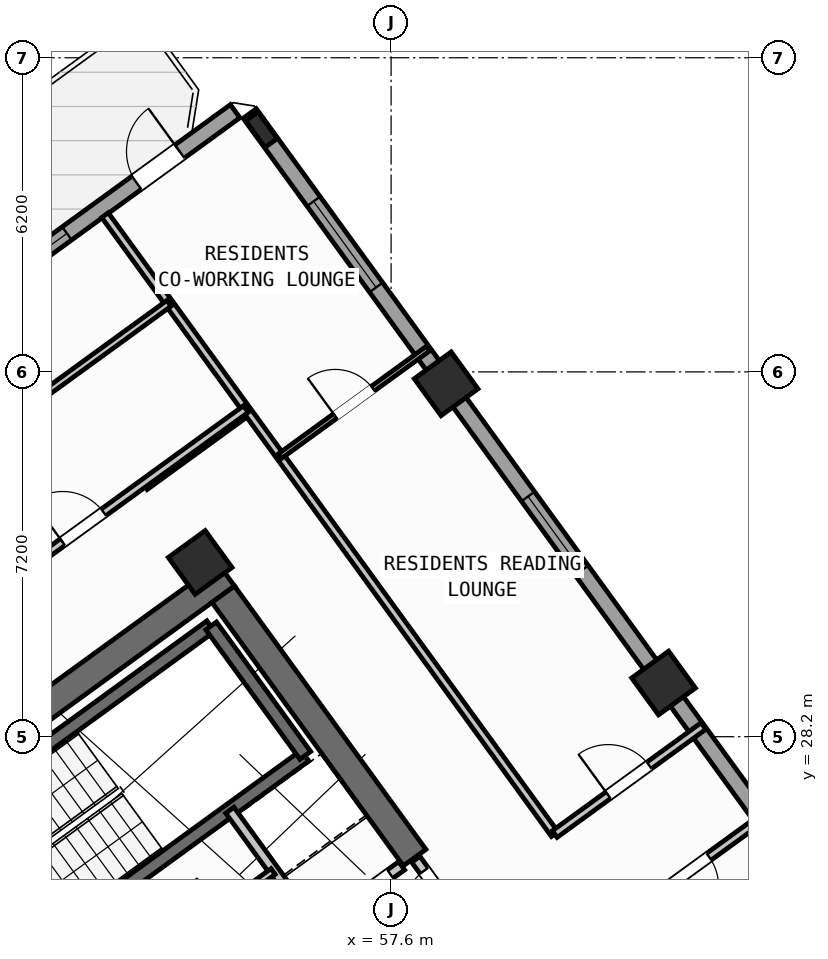
"""IFC4 building model, lengths in metres.
Left out: names, types, materials, properties, quantities, classifications, styles, units other than length and angle.
Written with IfcOpenShell. Run it as: python <this file> out.ifc"""

import sys

from ifc_helpers import new_model, si_unit, direction, frame, frame_2d, origin, origin_2d, place, context, subcontext, project, spatial, rectangle, hollow_rectangle, i_section, extrude, source, transform, mapped, element, fill, save


model = new_model("IFC4")
c1 = context("Model", 3, precision=1e-05, world=origin(), true_north=direction((0.0, 1.0)))
c2 = subcontext(c1, "Body", "Model", "MODEL_VIEW")
j1 = project(units=[si_unit("LENGTHUNIT", "METRE"), si_unit("PLANEANGLEUNIT", "RADIAN")], contexts=[c1])
p1 = place(None, origin())
s1 = spatial("IfcSite", under=j1, at=p1, CompositionType="ELEMENT")
p2 = place(p1, origin())
s2 = spatial("IfcBuilding", under=s1, at=p2, CompositionType="ELEMENT")
p3 = place(p2, frame((0.0, 0.0, 116.1)))
s3 = spatial("IfcBuildingStorey", under=s2, at=p3, CompositionType="ELEMENT", Elevation=116.1)
p4 = place(p3, frame((44.365, 24.142, 0.0), z_axis=(0.0, 0.0, 1.0), x_axis=(0.809024304885, 0.587775190107, 0.0)))
e1 = element("IfcWall", 1, at=p4, inside=s3, PredefinedType="SHEAR", context=c2, shape_type="SweptSolid", body=[
    extrude(rectangle(XDim=12.34, YDim=0.55, at=frame_2d((6.17, 0.0))), origin(), (0.0, 0.0, 1.0), 3.35),
])
p5 = place(p3, frame((58.064, 25.813, 0.0), z_axis=(0.0, 0.0, 1.0), x_axis=(-0.587764933797, 0.809031756236, 0.0)))
e2 = element("IfcWall", 2, at=p5, inside=s3, PredefinedType="SHEAR", context=c2, shape_type="SweptSolid", body=[
    extrude(rectangle(XDim=6.425, YDim=0.55, at=frame_2d((3.212, 0.0))), origin(), (0.0, 0.0, 1.0), 3.35),
])
m1 = source(origin(), c2, "Body", "SweptSolid", [
    extrude(hollow_rectangle(XDim=0.9, YDim=0.9, WallThickness=0.036, at=origin_2d()), origin(), (0.0, 0.0, 1.0), 3.6),
])
for number, where, z_axis, x_axis in (
    (3, (53.832, 31.638, 0.0), (0.0, 0.0, 1.0), (0.809, 0.588, 0.0)),
    (4, (62.977, 29.259, 0.0), (0.0, 0.0, 1.0), (0.809, 0.588, 0.0)),
    (5, (58.686, 35.165, 0.0), (0.0, 0.0, 1.0), (0.809, 0.588, 0.0)),
):
    element("IfcColumn", number, at=place(p3, frame(where, z_axis=z_axis, x_axis=x_axis)), inside=s3, PredefinedType="COLUMN", context=c2, shape_type="MappedRepresentation", body=[
        mapped(m1, transform((0.0, 0.0, 0.0), scale=1.0)),
    ])
m2 = source(origin(), c2, "Body", "SweptSolid", [
    extrude(i_section(OverallWidth=0.3, OverallDepth=0.65, WebThickness=0.016, FlangeThickness=0.031, at=origin_2d()), origin(), (0.0, 0.0, 1.0), 3.6),
])
p6 = place(p3, frame((55.042, 40.181, 0.0), z_axis=(0.0, 0.0, 1.0), x_axis=(0.809016994375, 0.587785252292, 0.0)))
e6 = element("IfcColumn", 6, at=p6, inside=s3, PredefinedType="COLUMN", context=c2, shape_type="MappedRepresentation", body=[
    mapped(m2, transform((0.0, 0.0, 0.0), scale=1.0)),
])
p7 = place(p3, frame((42.207, 31.597, 0.0), z_axis=(0.0, 0.0, 1.0), x_axis=(0.809020333377, 0.587780656523, 0.0)))
e7 = element("IfcWall", 7, at=p7, inside=s3, PredefinedType="STANDARD", context=c2, shape_type="SweptSolid", body=[
    extrude(rectangle(XDim=15.223, YDim=0.32, at=frame_2d((7.611, 0.0))), origin(), (0.0, 0.0, 1.0), 3.35),
])
p8 = place(p7, frame((12.82, 0.0, 0.0)))
e8 = element("IfcOpeningElement", 8, at=p8, cuts=e7, PredefinedType="OPENING", context=c2, shape_type="SweptSolid", body=[
    extrude(rectangle(XDim=1.05, YDim=2.15, at=frame_2d((0.525, 1.075))), frame((0.0, 0.17, 0.0), z_axis=(0.0, -1.0, 0.0), x_axis=(1.0, 0.0, 0.0)), (0.0, 0.0, 1.0), 0.34),
])
p9 = place(p7, frame((1.52, 0.0, 0.8)))
e9 = element("IfcOpeningElement", 9, at=p9, cuts=e7, PredefinedType="OPENING", context=c2, shape_type="SweptSolid", body=[
    extrude(rectangle(XDim=2.1, YDim=1.55, at=frame_2d((1.05, 0.775))), frame((0.0, 0.17, 0.0), z_axis=(0.0, -1.0, 0.0), x_axis=(1.0, 0.0, 0.0)), (0.0, 0.0, 1.0), 0.34),
])
p10 = place(p7, frame((5.76, 0.0, 0.8)))
e10 = element("IfcOpeningElement", 10, at=p10, cuts=e7, PredefinedType="OPENING", context=c2, shape_type="SweptSolid", body=[
    extrude(rectangle(XDim=2.1, YDim=1.55, at=frame_2d((1.05, 0.775))), frame((0.0, 0.17, 0.0), z_axis=(0.0, -1.0, 0.0), x_axis=(1.0, 0.0, 0.0)), (0.0, 0.0, 1.0), 0.34),
])
p11 = place(p7, frame((10.219, 0.0, 1.0)))
e11 = element("IfcOpeningElement", 11, at=p11, cuts=e7, PredefinedType="OPENING", context=c2, shape_type="SweptSolid", body=[
    extrude(rectangle(XDim=0.9, YDim=1.25, at=frame_2d((0.45, 0.625))), frame((0.0, 0.17, 0.0), z_axis=(0.0, -1.0, 0.0), x_axis=(1.0, 0.0, 0.0)), (0.0, 0.0, 1.0), 0.34),
])
p12 = place(p3, frame((54.81, 40.5, 0.0), z_axis=(0.0, 0.0, 1.0), x_axis=(0.587783625747, -0.809018176127, 0.0)))
e12 = element("IfcWall", 12, at=p12, inside=s3, PredefinedType="STANDARD", context=c2, shape_type="SweptSolid", body=[
    extrude(rectangle(XDim=21.587, YDim=0.32, at=frame_2d((10.794, 0.0))), origin(), (0.0, 0.0, 1.0), 2.775),
])
p13 = place(p12, frame((2.143, 0.0, 0.8)))
e13 = element("IfcOpeningElement", 13, at=p13, cuts=e12, PredefinedType="OPENING", context=c2, shape_type="SweptSolid", body=[
    extrude(rectangle(XDim=2.1, YDim=1.55, at=frame_2d((1.05, 0.775))), frame((0.0, 0.17, 0.0), z_axis=(0.0, -1.0, 0.0), x_axis=(1.0, 0.0, 0.0)), (0.0, 0.0, 1.0), 0.34),
])
p14 = place(p12, frame((9.344, 0.0, 0.85)))
e14 = element("IfcOpeningElement", 14, at=p14, cuts=e12, PredefinedType="OPENING", context=c2, shape_type="SweptSolid", body=[
    extrude(rectangle(XDim=1.8, YDim=1.5, at=frame_2d((0.9, 0.75))), frame((0.0, 0.17, 0.0), z_axis=(0.0, -1.0, 0.0), x_axis=(1.0, 0.0, 0.0)), (0.0, 0.0, 1.0), 0.34),
])
p15 = place(p12, frame((18.309, 0.0, 0.85)))
e15 = element("IfcOpeningElement", 15, at=p15, cuts=e12, PredefinedType="OPENING", context=c2, shape_type="SweptSolid", body=[
    extrude(rectangle(XDim=1.5, YDim=1.5, at=frame_2d((0.75, 0.75))), frame((0.0, 0.17, 0.0), z_axis=(0.0, -1.0, 0.0), x_axis=(1.0, 0.0, 0.0)), (0.0, 0.0, 1.0), 0.34),
])
p16 = place(p3, frame((48.006, 25.996, 0.0), z_axis=(0.0, 0.0, 1.0), x_axis=(0.80901903764, 0.587782439969, 0.0)))
e16 = element("IfcWall", 16, at=p16, inside=s3, PredefinedType="SHEAR", context=c2, shape_type="SweptSolid", body=[
    extrude(rectangle(XDim=7.46, YDim=0.26, at=frame_2d((3.73, 0.0))), origin(), (0.0, 0.0, 1.0), 3.35),
])
p17 = place(p3, frame((49.863, 23.44, 0.0), z_axis=(0.0, 0.0, 1.0), x_axis=(0.809003474932, 0.587803859759, 0.0)))
e17 = element("IfcWall", 17, at=p17, inside=s3, PredefinedType="SHEAR", context=c2, shape_type="SweptSolid", body=[
    extrude(rectangle(XDim=7.46, YDim=0.26, at=frame_2d((3.73, 0.0))), origin(), (0.0, 0.0, 1.0), 3.35),
])
p18 = place(p17, frame((0.36, 0.0, 0.0)))
e18 = element("IfcOpeningElement", 18, at=p18, cuts=e17, PredefinedType="OPENING", context=c2, shape_type="SweptSolid", body=[
    extrude(rectangle(XDim=0.86, YDim=2.05, at=frame_2d((0.43, 1.025))), frame((0.0, 0.14, 0.0), z_axis=(0.0, -1.0, 0.0), x_axis=(1.0, 0.0, 0.0)), (0.0, 0.0, 1.0), 0.28),
])
p19 = place(p3, frame((55.906, 27.831, 0.0), z_axis=(0.0, 0.0, 1.0), x_axis=(-0.587804123638, 0.809003283204, 0.0)))
e19 = element("IfcWall", 19, at=p19, inside=s3, PredefinedType="SHEAR", context=c2, shape_type="SweptSolid", body=[
    extrude(rectangle(XDim=3.16, YDim=0.26, at=frame_2d((1.58, 0.0))), origin(), (0.0, 0.0, 1.0), 3.35),
])
p20 = place(p3, frame((56.111, 24.419, 0.0), z_axis=(0.0, 0.0, 1.0), x_axis=(-0.58777848983, 0.809021907548, 0.0)))
e20 = element("IfcWall", 20, at=p20, inside=s3, PredefinedType="STANDARD", context=c2, shape_type="SweptSolid", body=[
    extrude(rectangle(XDim=2.88, YDim=0.2, at=frame_2d((1.44, 0.0))), origin(), (0.0, 0.0, 1.0), 3.34),
])
p21 = place(p3, frame((53.425, 22.468, 0.0), z_axis=(0.0, 0.0, 1.0), x_axis=(0.809024377198, 0.587775090574, 0.0)))
e21 = element("IfcWall", 21, at=p21, inside=s3, PredefinedType="STANDARD", context=c2, shape_type="SweptSolid", body=[
    extrude(rectangle(XDim=5.418, YDim=0.2, at=frame_2d((2.709, 0.0))), origin(), (0.0, 0.0, 1.0), 3.34),
])
p22 = place(p21, frame((4.28, 0.0, 0.0)))
e22 = element("IfcOpeningElement", 22, at=p22, cuts=e21, PredefinedType="OPENING", context=c2, shape_type="SweptSolid", body=[
    extrude(rectangle(XDim=0.86, YDim=2.05, at=frame_2d((0.43, 1.025))), frame((0.0, 0.11, 0.0), z_axis=(0.0, -1.0, 0.0), x_axis=(1.0, 0.0, 0.0)), (0.0, 0.0, 1.0), 0.22),
])
p23 = place(p21, frame((1.45, 0.0, 0.0)))
e23 = element("IfcOpeningElement", 23, at=p23, cuts=e21, PredefinedType="OPENING", context=c2, shape_type="SweptSolid", body=[
    extrude(rectangle(XDim=0.86, YDim=2.05, at=frame_2d((0.43, 1.025))), frame((0.0, 0.11, 0.0), z_axis=(0.0, -1.0, 0.0), x_axis=(1.0, 0.0, 0.0)), (0.0, 0.0, 1.0), 0.22),
])
p24 = place(p3, frame((52.618, 23.612, 0.0), z_axis=(0.0, 0.0, 1.0), x_axis=(0.809009587469, 0.587795446889, 0.0)))
e24 = element("IfcWall", 24, at=p24, inside=s3, PredefinedType="PLUMBINGWALL", context=c2, shape_type="SweptSolid", body=[
    extrude(rectangle(XDim=3.28, YDim=0.14, at=frame_2d((1.64, 0.0))), origin(), (0.0, 0.0, 1.0), 3.34),
])
p25 = place(p24, frame((1.2, 0.0, 0.0)))
e25 = element("IfcOpeningElement", 25, at=p25, cuts=e24, PredefinedType="OPENING", context=c2, shape_type="SweptSolid", body=[
    extrude(rectangle(XDim=0.78, YDim=2.05, at=frame_2d((0.39, 1.025))), frame((0.0, 0.08, 0.0), z_axis=(0.0, -1.0, 0.0), x_axis=(1.0, 0.0, 0.0)), (0.0, 0.0, 1.0), 0.16),
])
p26 = place(p3, frame((59.827, 23.386, 0.0), z_axis=(0.0, 0.0, 1.0), x_axis=(-0.587803840107, 0.809003489211, 0.0)))
e26 = element("IfcWall", 26, at=p26, inside=s3, PredefinedType="STANDARD", context=c2, shape_type="SweptSolid", body=[
    extrude(rectangle(XDim=2.96, YDim=0.2, at=frame_2d((1.48, 0.0))), origin(), (0.0, 0.0, 1.0), 3.34),
])
p27 = place(p26, frame((1.68, 0.0, 0.0)))
e27 = element("IfcOpeningElement", 27, at=p27, cuts=e26, PredefinedType="OPENING", context=c2, shape_type="SweptSolid", body=[
    extrude(rectangle(XDim=1.0, YDim=2.1, at=frame_2d((0.5, 1.05))), frame((0.0, 0.11, 0.0), z_axis=(0.0, -1.0, 0.0), x_axis=(1.0, 0.0, 0.0)), (0.0, 0.0, 1.0), 0.22),
])
p28 = place(p3, frame((52.739, 33.143, 0.0), z_axis=(0.0, 0.0, 1.0), x_axis=(0.809000999347, 0.58780726693, 0.0)))
e28 = element("IfcWall", 28, at=p28, inside=s3, PredefinedType="PARTITIONING", context=c2, shape_type="SweptSolid", body=[
    extrude(rectangle(XDim=2.51, YDim=0.16, at=frame_2d((1.255, 0.0))), origin(), (0.0, 0.0, 1.0), 3.34),
])
p29 = place(p3, frame((60.829, 26.278, 0.0), z_axis=(0.0, 0.0, 1.0), x_axis=(-0.587777474174, 0.809022645451, 0.0)))
e29 = element("IfcWall", 29, at=p29, inside=s3, PredefinedType="PARTITIONING", context=c2, shape_type="SweptSolid", body=[
    extrude(rectangle(XDim=15.1, YDim=0.16, at=frame_2d((7.55, 0.0))), origin(), (0.0, 0.0, 1.0), 3.34),
])
p30 = place(p3, frame((62.093, 24.538, 0.0), z_axis=(0.0, 0.0, 1.0), x_axis=(0.809035546126, 0.58775971715, 0.0)))
e30 = element("IfcWall", 30, at=p30, inside=s3, PredefinedType="PARTITIONING", context=c2, shape_type="SweptSolid", body=[
    extrude(rectangle(XDim=3.63, YDim=0.16, at=frame_2d((1.815, 0.0))), origin(), (0.0, 0.0, 1.0), 3.34),
])
p31 = place(p30, frame((1.2, 0.0, 0.0)))
e31 = element("IfcOpeningElement", 31, at=p31, cuts=e30, PredefinedType="OPENING", context=c2, shape_type="SweptSolid", body=[
    extrude(rectangle(XDim=1.0, YDim=2.1, at=frame_2d((0.5, 1.05))), frame((0.0, 0.09, 0.0), z_axis=(0.0, -1.0, 0.0), x_axis=(1.0, 0.0, 0.0)), (0.0, 0.0, 1.0), 0.18),
])
p32 = place(p3, frame((60.829, 26.278, 0.0), z_axis=(0.0, 0.0, 1.0), x_axis=(0.809003564202, 0.587803736896, 0.0)))
e32 = element("IfcWall", 32, at=p32, inside=s3, PredefinedType="PARTITIONING", context=c2, shape_type="SweptSolid", body=[
    extrude(rectangle(XDim=3.63, YDim=0.16, at=frame_2d((1.815, 0.0))), origin(), (0.0, 0.0, 1.0), 3.34),
])
p33 = place(p32, frame((1.305, 0.0, 0.0)))
e33 = element("IfcOpeningElement", 33, at=p33, cuts=e32, PredefinedType="OPENING", context=c2, shape_type="SweptSolid", body=[
    extrude(rectangle(XDim=1.0, YDim=2.1, at=frame_2d((0.5, 1.05))), frame((0.0, 0.09, 0.0), z_axis=(0.0, -1.0, 0.0), x_axis=(1.0, 0.0, 0.0)), (0.0, 0.0, 1.0), 0.18),
])
p34 = place(p3, frame((55.409, 33.738, 0.0), z_axis=(0.0, 0.0, 1.0), x_axis=(0.809005039917, 0.58780170584, 0.0)))
e34 = element("IfcWall", 34, at=p34, inside=s3, PredefinedType="PARTITIONING", context=c2, shape_type="SweptSolid", body=[
    extrude(rectangle(XDim=3.61, YDim=0.11, at=frame_2d((1.805, 0.0))), origin(), (0.0, 0.0, 1.0), 3.34),
])
p35 = place(p34, frame((1.345, 0.0, 0.0)))
e35 = element("IfcOpeningElement", 35, at=p35, cuts=e34, PredefinedType="OPENING", context=c2, shape_type="SweptSolid", body=[
    extrude(rectangle(XDim=0.92, YDim=2.08, at=frame_2d((0.46, 1.04))), frame((0.0, 0.065, 0.0), z_axis=(0.0, -1.0, 0.0), x_axis=(1.0, 0.0, 0.0)), (0.0, 0.0, 1.0), 0.13),
])
p36 = place(p3, frame((42.866, 26.044, 0.0), z_axis=(0.0, 0.0, 1.0), x_axis=(0.809020254154, 0.587780765566, 0.0)))
e36 = element("IfcWall", 36, at=p36, inside=s3, PredefinedType="PARTITIONING", context=c2, shape_type="SweptSolid", body=[
    extrude(rectangle(XDim=14.67, YDim=0.16, at=frame_2d((7.335, 0.0))), origin(), (0.0, 0.0, 1.0), 3.34),
])
p37 = place(p36, frame((10.2, 0.0, 0.0)))
e37 = element("IfcOpeningElement", 37, at=p37, cuts=e36, PredefinedType="OPENING", context=c2, shape_type="SweptSolid", body=[
    extrude(rectangle(XDim=1.0, YDim=2.1, at=frame_2d((0.5, 1.05))), frame((0.0, 0.09, 0.0), z_axis=(0.0, -1.0, 0.0), x_axis=(1.0, 0.0, 0.0)), (0.0, 0.0, 1.0), 0.18),
])
p38 = place(p3, frame((42.377, 28.878, 0.0), z_axis=(0.0, 0.0, 1.0), x_axis=(0.809020411523, 0.587780548963, 0.0)))
e38 = element("IfcWall", 38, at=p38, inside=s3, PredefinedType="PLUMBINGWALL", context=c2, shape_type="SweptSolid", body=[
    extrude(rectangle(XDim=13.4, YDim=0.14, at=frame_2d((6.7, 0.0))), origin(), (0.0, 0.0, 1.0), 3.34),
])
p39 = place(p38, frame((8.94, 0.0, 0.0)))
e39 = element("IfcOpeningElement", 39, at=p39, cuts=e38, PredefinedType="OPENING", context=c2, shape_type="SweptSolid", body=[
    extrude(rectangle(XDim=0.92, YDim=2.08, at=frame_2d((0.46, 1.04))), frame((0.0, 0.08, 0.0), z_axis=(0.0, -1.0, 0.0), x_axis=(1.0, 0.0, 0.0)), (0.0, 0.0, 1.0), 0.16),
])
m3 = source(origin(), c2, "Body", "SweptSolid", [
    extrude(rectangle(XDim=1.05, YDim=2.15, at=frame_2d((0.525, 1.075))), frame((0.0, 0.025, 0.0), z_axis=(0.0, -1.0, 0.0), x_axis=(1.0, 0.0, 0.0)), (0.0, 0.0, 1.0), 0.05),
])
p40 = place(p8, origin())
e40 = element("IfcDoor", 40, at=p40, inside=s3, OperationType="SINGLE_SWING_RIGHT", PredefinedType="DOOR", context=c2, shape_type="MappedRepresentation", body=[
    mapped(m3, transform((0.0, 0.0, 0.0), scale=1.0)),
])
fill(e8, e40)
m4 = source(origin(), c2, "Body", "SweptSolid", [
    extrude(rectangle(XDim=0.9, YDim=1.25, at=frame_2d((0.45, 0.625))), frame((0.0, 0.03, 0.0), z_axis=(0.0, -1.0, 0.0), x_axis=(1.0, 0.0, 0.0)), (0.0, 0.0, 1.0), 0.06),
])
p41 = place(p11, origin())
e41 = element("IfcWindow", 41, at=p41, inside=s3, PartitioningType="SINGLE_PANEL", PredefinedType="WINDOW", context=c2, shape_type="MappedRepresentation", body=[
    mapped(m4, transform((0.0, 0.0, 0.0), scale=1.0)),
])
fill(e11, e41)
m5 = source(origin(), c2, "Body", "SweptSolid", [
    extrude(rectangle(XDim=2.1, YDim=1.55, at=frame_2d((1.05, 0.775))), frame((0.0, 0.03, 0.0), z_axis=(0.0, -1.0, 0.0), x_axis=(1.0, 0.0, 0.0)), (0.0, 0.0, 1.0), 0.06),
])
p42 = place(p13, origin())
e42 = element("IfcWindow", 42, at=p42, inside=s3, PartitioningType="SINGLE_PANEL", PredefinedType="WINDOW", context=c2, shape_type="MappedRepresentation", body=[
    mapped(m5, transform((0.0, 0.0, 0.0), scale=1.0)),
])
fill(e13, e42)
m6 = source(origin(), c2, "Body", "SweptSolid", [
    extrude(rectangle(XDim=1.8, YDim=1.5, at=frame_2d((0.9, 0.75))), frame((0.0, 0.03, 0.0), z_axis=(0.0, -1.0, 0.0), x_axis=(1.0, 0.0, 0.0)), (0.0, 0.0, 1.0), 0.06),
])
p43 = place(p14, origin())
e43 = element("IfcWindow", 43, at=p43, inside=s3, PartitioningType="SINGLE_PANEL", PredefinedType="WINDOW", context=c2, shape_type="MappedRepresentation", body=[
    mapped(m6, transform((0.0, 0.0, 0.0), scale=1.0)),
])
fill(e14, e43)
m7 = source(origin(), c2, "Body", "SweptSolid", [
    extrude(rectangle(XDim=0.86, YDim=2.05, at=frame_2d((0.43, 1.025))), frame((0.0, 0.025, 0.0), z_axis=(0.0, -1.0, 0.0), x_axis=(1.0, 0.0, 0.0)), (0.0, 0.0, 1.0), 0.05),
])
p44 = place(p22, frame((0.86, 0.0, 0.0), z_axis=(0.0, 0.0, 1.0), x_axis=(-1.0, 0.0, 0.0)))
e44 = element("IfcDoor", 44, at=p44, inside=s3, OperationType="SINGLE_SWING_RIGHT", PredefinedType="DOOR", context=c2, shape_type="MappedRepresentation", body=[
    mapped(m7, transform((0.0, 0.0, 0.0), scale=1.0)),
])
fill(e22, e44)
m8 = source(origin(), c2, "Body", "SweptSolid", [
    extrude(rectangle(XDim=1.0, YDim=2.1, at=frame_2d((0.5, 1.05))), frame((0.0, 0.025, 0.0), z_axis=(0.0, -1.0, 0.0), x_axis=(1.0, 0.0, 0.0)), (0.0, 0.0, 1.0), 0.05),
])
p45 = place(p27, origin())
e45 = element("IfcDoor", 45, at=p45, inside=s3, OperationType="SINGLE_SWING_LEFT", PredefinedType="DOOR", context=c2, shape_type="MappedRepresentation", body=[
    mapped(m8, transform((0.0, 0.0, 0.0), scale=1.0)),
])
fill(e27, e45)
p46 = place(p33, origin())
e46 = element("IfcDoor", 46, at=p46, inside=s3, OperationType="SINGLE_SWING_LEFT", PredefinedType="DOOR", context=c2, shape_type="MappedRepresentation", body=[
    mapped(m8, transform((0.0, 0.0, 0.0), scale=1.0)),
])
fill(e33, e46)
m9 = source(origin(), c2, "Body", "SweptSolid", [
    extrude(rectangle(XDim=0.92, YDim=2.08, at=frame_2d((0.46, 1.04))), frame((0.0, 0.025, 0.0), z_axis=(0.0, -1.0, 0.0), x_axis=(1.0, 0.0, 0.0)), (0.0, 0.0, 1.0), 0.05),
])
p47 = place(p35, origin())
e47 = element("IfcDoor", 47, at=p47, inside=s3, OperationType="SINGLE_SWING_LEFT", PredefinedType="DOOR", context=c2, shape_type="MappedRepresentation", body=[
    mapped(m9, transform((0.0, 0.0, 0.0), scale=1.0)),
])
fill(e35, e47)
p48 = place(p31, frame((1.0, 0.0, 0.0), z_axis=(0.0, 0.0, 1.0), x_axis=(-1.0, 0.0, 0.0)))
e48 = element("IfcDoor", 48, at=p48, inside=s3, OperationType="SINGLE_SWING_RIGHT", PredefinedType="DOOR", context=c2, shape_type="MappedRepresentation", body=[
    mapped(m8, transform((0.0, 0.0, 0.0), scale=1.0)),
])
fill(e31, e48)
p49 = place(p37, origin())
e49 = element("IfcDoor", 49, at=p49, inside=s3, OperationType="SINGLE_SWING_LEFT", PredefinedType="DOOR", context=c2, shape_type="MappedRepresentation", body=[
    mapped(m8, transform((0.0, 0.0, 0.0), scale=1.0)),
])
fill(e37, e49)
save(model, sys.argv[1])
